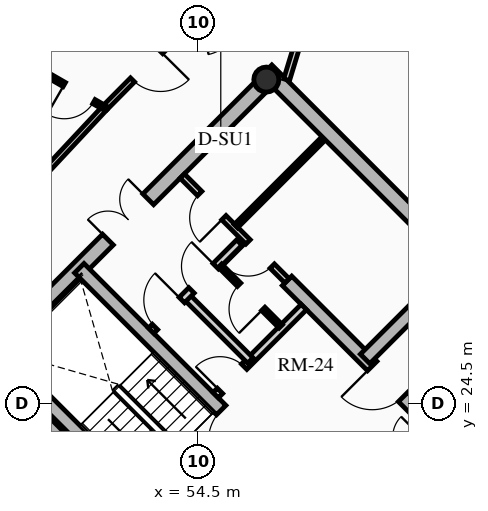
"""IFC4 building model, lengths in metres.
Left out: names, types, materials, properties, quantities, classifications, styles, units other than length and angle.
Written with IfcOpenShell. Run it as: python <this file> out.ifc"""

import sys

from ifc_helpers import new_model, si_unit, direction, frame, frame_2d, origin, origin_2d, place, context, subcontext, project, spatial, rectangle, hollow_circle, extrude, source, transform, mapped, element, fill, save


model = new_model("IFC4")
c1 = context("Model", 3, precision=1e-05, world=origin(), true_north=direction((0.0, 1.0)))
c2 = subcontext(c1, "Body", "Model", "MODEL_VIEW")
j1 = project(units=[si_unit("LENGTHUNIT", "METRE"), si_unit("PLANEANGLEUNIT", "RADIAN")], contexts=[c1])
p1 = place(None, origin())
s1 = spatial("IfcSite", under=j1, at=p1, CompositionType="ELEMENT")
p2 = place(p1, origin())
s2 = spatial("IfcBuilding", under=s1, at=p2, CompositionType="ELEMENT")
p3 = place(p2, frame((0.0, 0.0, 205.39)))
s3 = spatial("IfcBuildingStorey", under=s2, at=p3, CompositionType="ELEMENT", Elevation=205.39)
for number, where, z_axis, x_axis in (
    (1, (58.702, 15.732, 0.0), (0.0, 0.0, 1.0), (-0.707, 0.707, 0.0)),
    (2, (66.268, 23.298, 0.0), (0.0, 0.0, 1.0), (-0.707, 0.707, 0.0)),
):
    element("IfcWall", number, at=place(p3, frame(where, z_axis=z_axis, x_axis=x_axis)), inside=s3, PredefinedType="SHEAR", context=c2, shape_type="SweptSolid", body=[
        extrude(rectangle(XDim=14.1, YDim=0.4, at=frame_2d((7.05, 0.0))), origin(), (0.0, 0.0, 1.0), 2.91),
    ])
p4 = place(p3, frame((48.873, 25.561, 0.0), z_axis=(0.0, 0.0, 1.0), x_axis=(0.707106781187, 0.707106781187, 0.0)))
e3 = element("IfcWall", 3, at=p4, inside=s3, PredefinedType="SHEAR", context=c2, shape_type="SweptSolid", body=[
    extrude(rectangle(XDim=10.7, YDim=0.4, at=frame_2d((5.35, 0.0))), origin(), (0.0, 0.0, 1.0), 2.91),
])
m1 = source(origin(), c2, "Body", "SweptSolid", [
    extrude(rectangle(XDim=1.5, YDim=2.02, at=frame_2d((0.75, 1.01))), frame((0.0, 0.21, 0.0), z_axis=(0.0, -1.0, 0.0), x_axis=(1.0, 0.0, 0.0)), (0.0, 0.0, 1.0), 0.42),
])
p5 = place(p4, frame((4.6, 0.0, 0.0)))
e4 = element("IfcOpeningElement", 4, at=p5, cuts=e3, PredefinedType="OPENING", context=c2, shape_type="MappedRepresentation", body=[
    mapped(m1, transform((0.0, 0.0, 0.0), x_axis=(1.0, 0.0, 0.0), y_axis=(0.0, 1.0, 0.0), z_axis=(0.0, 0.0, 1.0), scale=1.0)),
])
p6 = place(p3, frame((61.06, 18.373, 0.0), z_axis=(0.0, 0.0, 1.0), x_axis=(-0.707106781187, 0.707106781187, 0.0)))
e5 = element("IfcWall", 5, at=p6, inside=s3, PredefinedType="SHEAR", context=c2, shape_type="SweptSolid", body=[
    extrude(rectangle(XDim=13.7, YDim=0.35, at=frame_2d((6.85, 0.0))), origin(), (0.0, 0.0, 1.0), 2.91),
])
m2 = source(origin(), c2, "Body", "SweptSolid", [
    extrude(rectangle(XDim=1.1, YDim=2.015, at=frame_2d((0.55, 1.007))), frame((0.0, 0.185, 0.0), z_axis=(0.0, -1.0, 0.0), x_axis=(1.0, 0.0, 0.0)), (0.0, 0.0, 1.0), 0.37),
])
p7 = place(p6, frame((4.85, 0.0, 0.0)))
e6 = element("IfcOpeningElement", 6, at=p7, cuts=e5, PredefinedType="OPENING", context=c2, shape_type="MappedRepresentation", body=[
    mapped(m2, transform((0.0, 0.0, 0.0), x_axis=(1.0, 0.0, 0.0), y_axis=(0.0, 1.0, 0.0), z_axis=(0.0, 0.0, 1.0), scale=1.0)),
])
p8 = place(p6, frame((0.625, 0.0, 0.0)))
e7 = element("IfcOpeningElement", 7, at=p8, cuts=e5, PredefinedType="OPENING", context=c2, shape_type="MappedRepresentation", body=[
    mapped(m2, transform((0.0, 0.0, 0.0), x_axis=(1.0, 0.0, 0.0), y_axis=(0.0, 1.0, 0.0), z_axis=(0.0, 0.0, 1.0), scale=1.0)),
])
p9 = place(p6, frame((2.625, 0.0, 0.0)))
e8 = element("IfcOpeningElement", 8, at=p9, cuts=e5, PredefinedType="OPENING", context=c2, shape_type="MappedRepresentation", body=[
    mapped(m2, transform((0.0, 0.0, 0.0), x_axis=(1.0, 0.0, 0.0), y_axis=(0.0, 1.0, 0.0), z_axis=(0.0, 0.0, 1.0), scale=1.0)),
])
m3 = source(origin(), c2, "Body", "SweptSolid", [
    extrude(rectangle(XDim=1.15, YDim=2.02, at=frame_2d((0.575, 1.01))), frame((0.0, 0.185, 0.0), z_axis=(0.0, -1.0, 0.0), x_axis=(1.0, 0.0, 0.0)), (0.0, 0.0, 1.0), 0.37),
])
p10 = place(p6, frame((7.27, 0.0, 0.0)))
e9 = element("IfcOpeningElement", 9, at=p10, cuts=e5, PredefinedType="OPENING", context=c2, shape_type="MappedRepresentation", body=[
    mapped(m3, transform((0.0, 0.0, 0.0), x_axis=(1.0, 0.0, 0.0), y_axis=(0.0, 1.0, 0.0), z_axis=(0.0, 0.0, 1.0), scale=1.0)),
])
p11 = place(p3, frame((63.627, 20.94, 0.0), z_axis=(0.0, 0.0, 1.0), x_axis=(-0.707119496762, 0.707094065383, 0.0)))
e10 = element("IfcWall", 10, at=p11, inside=s3, PredefinedType="SHEAR", context=c2, shape_type="SweptSolid", body=[
    extrude(rectangle(XDim=9.6, YDim=0.35, at=frame_2d((4.8, 0.0))), origin(), (0.0, 0.0, 1.0), 2.91),
])
p12 = place(p11, frame((5.28, 0.0, 0.0)))
e11 = element("IfcOpeningElement", 11, at=p12, cuts=e10, PredefinedType="OPENING", context=c2, shape_type="MappedRepresentation", body=[
    mapped(m3, transform((0.0, 0.0, 0.0), x_axis=(1.0, 0.0, 0.0), y_axis=(0.0, 1.0, 0.0), z_axis=(0.0, 0.0, 1.0), scale=1.0)),
])
p13 = place(p3, frame((53.922, 21.141, 0.0), z_axis=(0.0, 0.0, 1.0), x_axis=(-0.707106781187, 0.707106781187, 0.0)))
e12 = element("IfcWall", 12, at=p13, inside=s3, PredefinedType="SHEAR", context=c2, shape_type="SweptSolid", body=[
    extrude(rectangle(XDim=6.695, YDim=0.35, at=frame_2d((3.348, 0.0))), origin(), (0.0, 0.0, 1.0), 2.91),
])
p14 = place(p3, frame((58.893, 25.674, 0.0), z_axis=(0.0, 0.0, 1.0), x_axis=(0.707106781187, 0.707106781187, 0.0)))
e13 = element("IfcWall", 13, at=p14, inside=s3, PredefinedType="SHEAR", context=c2, shape_type="SweptSolid", body=[
    extrude(rectangle(XDim=3.285, YDim=0.35, at=frame_2d((1.643, 0.0))), origin(), (0.0, 0.0, 1.0), 2.91),
])
p15 = place(p3, frame((56.294, 33.024, 0.0), z_axis=(0.0, 0.0, 1.0), x_axis=(0.707106781187, 0.707106781187, 0.0)))
e14 = element("IfcColumn", 14, at=p15, inside=s3, PredefinedType="COLUMN", context=c2, shape_type="SweptSolid", body=[
    extrude(hollow_circle(Radius=0.33, WallThickness=0.025, at=origin_2d()), origin(), (0.0, 0.0, 1.0), 2.91),
])
p16 = place(p3, frame((58.214, 21.467, 0.0), z_axis=(0.0, 0.0, 1.0), x_axis=(0.707106781187, 0.707106781187, 0.0)))
e15 = element("IfcWall", 15, at=p16, inside=s3, PredefinedType="PARTITIONING", context=c2, shape_type="SweptSolid", body=[
    extrude(rectangle(XDim=3.28, YDim=0.2, at=frame_2d((1.64, 0.0))), origin(), (0.0, 0.0, 1.0), 2.685),
])
m4 = source(origin(), c2, "Body", "SweptSolid", [
    extrude(rectangle(XDim=1.5, YDim=2.02, at=frame_2d((0.75, 1.01))), frame((0.0, 0.11, 0.0), z_axis=(0.0, -1.0, 0.0), x_axis=(1.0, 0.0, 0.0)), (0.0, 0.0, 1.0), 0.22),
])
p17 = place(p16, frame((1.55, 0.0, 0.0)))
e16 = element("IfcOpeningElement", 16, at=p17, cuts=e15, PredefinedType="OPENING", context=c2, shape_type="MappedRepresentation", body=[
    mapped(m4, transform((0.0, 0.0, 0.0), x_axis=(1.0, 0.0, 0.0), y_axis=(0.0, 1.0, 0.0), z_axis=(0.0, 0.0, 1.0), scale=1.0)),
])
p18 = place(p3, frame((54.961, 24.719, 0.0), z_axis=(0.0, 0.0, 1.0), x_axis=(0.707106781187, 0.707106781187, 0.0)))
e17 = element("IfcWall", 17, at=p18, inside=s3, PredefinedType="PARTITIONING", context=c2, shape_type="SweptSolid", body=[
    extrude(rectangle(XDim=3.28, YDim=0.2, at=frame_2d((1.64, 0.0))), origin(), (0.0, 0.0, 1.0), 2.685),
])
m5 = source(origin(), c2, "Body", "SweptSolid", [
    extrude(rectangle(XDim=0.9, YDim=2.005, at=frame_2d((0.45, 1.002))), frame((0.0, 0.11, 0.0), z_axis=(0.0, -1.0, 0.0), x_axis=(1.0, 0.0, 0.0)), (0.0, 0.0, 1.0), 0.22),
])
p19 = place(p18, frame((0.16, 0.0, 0.0)))
e18 = element("IfcOpeningElement", 18, at=p19, cuts=e17, PredefinedType="OPENING", context=c2, shape_type="MappedRepresentation", body=[
    mapped(m5, transform((0.0, 0.0, 0.0), x_axis=(1.0, 0.0, 0.0), y_axis=(0.0, 1.0, 0.0), z_axis=(0.0, 0.0, 1.0), scale=1.0)),
])
p20 = place(p3, frame((55.874, 25.631, 0.0), z_axis=(0.0, 0.0, 1.0), x_axis=(-0.707157639372, 0.707055919343, 0.0)))
e19 = element("IfcWall", 19, at=p20, inside=s3, PredefinedType="PARTITIONING", context=c2, shape_type="SweptSolid", body=[
    extrude(rectangle(XDim=2.4, YDim=0.2, at=frame_2d((1.2, 0.0))), origin(), (0.0, 0.0, 1.0), 2.685),
])
p21 = place(p3, frame((53.264, 26.416, 0.0), z_axis=(0.0, 0.0, 1.0), x_axis=(0.707106781187, 0.707106781187, 0.0)))
e20 = element("IfcWall", 20, at=p21, inside=s3, PredefinedType="PARTITIONING", context=c2, shape_type="SweptSolid", body=[
    extrude(rectangle(XDim=3.28, YDim=0.2, at=frame_2d((1.64, 0.0))), origin(), (0.0, 0.0, 1.0), 2.685),
])
m6 = source(origin(), c2, "Body", "SweptSolid", [
    extrude(rectangle(XDim=1.0, YDim=2.015, at=frame_2d((0.5, 1.007))), frame((0.0, 0.11, 0.0), z_axis=(0.0, -1.0, 0.0), x_axis=(1.0, 0.0, 0.0)), (0.0, 0.0, 1.0), 0.22),
])
p22 = place(p21, frame((0.14, 0.0, 0.0)))
e21 = element("IfcOpeningElement", 21, at=p22, cuts=e20, PredefinedType="OPENING", context=c2, shape_type="MappedRepresentation", body=[
    mapped(m6, transform((0.0, 0.0, 0.0), x_axis=(1.0, 0.0, 0.0), y_axis=(0.0, 1.0, 0.0), z_axis=(0.0, 0.0, 1.0), scale=1.0)),
])
p23 = place(p21, frame((1.5, 0.0, 0.0)))
e22 = element("IfcOpeningElement", 22, at=p23, cuts=e20, PredefinedType="OPENING", context=c2, shape_type="MappedRepresentation", body=[
    mapped(m5, transform((0.0, 0.0, 0.0), x_axis=(1.0, 0.0, 0.0), y_axis=(0.0, 1.0, 0.0), z_axis=(0.0, 0.0, 1.0), scale=1.0)),
])
p24 = place(p3, frame((56.673, 26.529, 0.0), z_axis=(0.0, 0.0, 1.0), x_axis=(-0.707052764397, 0.70716079385, 0.0)))
e23 = element("IfcWall", 23, at=p24, inside=s3, PredefinedType="PARTITIONING", context=c2, shape_type="SweptSolid", body=[
    extrude(rectangle(XDim=2.26, YDim=0.125, at=frame_2d((1.13, 0.0))), origin(), (0.0, 0.0, 1.0), 2.685),
])
m7 = source(origin(), c2, "Body", "SweptSolid", [
    extrude(rectangle(XDim=0.9, YDim=2.005, at=frame_2d((0.45, 1.002))), frame((0.0, 0.073, 0.0), z_axis=(0.0, -1.0, 0.0), x_axis=(1.0, 0.0, 0.0)), (0.0, 0.0, 1.0), 0.145),
])
p25 = place(p24, frame((0.65, 0.0, 0.0)))
e24 = element("IfcOpeningElement", 24, at=p25, cuts=e23, PredefinedType="OPENING", context=c2, shape_type="MappedRepresentation", body=[
    mapped(m7, transform((0.0, 0.0, 0.0), x_axis=(1.0, 0.0, 0.0), y_axis=(0.0, 1.0, 0.0), z_axis=(0.0, 0.0, 1.0), scale=1.0)),
])
p26 = place(p3, frame((56.839, 27.728, 0.0), z_axis=(0.0, 0.0, 1.0), x_axis=(-0.707106781187, 0.707106781187, 0.0)))
e25 = element("IfcWall", 25, at=p26, inside=s3, PredefinedType="PARTITIONING", context=c2, shape_type="SweptSolid", body=[
    extrude(rectangle(XDim=3.9, YDim=0.16, at=frame_2d((1.95, 0.0))), origin(), (0.0, 0.0, 1.0), 2.685),
])
m8 = source(origin(), c2, "Body", "SweptSolid", [
    extrude(rectangle(XDim=0.9, YDim=2.005, at=frame_2d((0.45, 1.002))), frame((0.0, 0.09, 0.0), z_axis=(0.0, -1.0, 0.0), x_axis=(1.0, 0.0, 0.0)), (0.0, 0.0, 1.0), 0.18),
])
p27 = place(p26, frame((0.55, 0.0, 0.0)))
e26 = element("IfcOpeningElement", 26, at=p27, cuts=e25, PredefinedType="OPENING", context=c2, shape_type="MappedRepresentation", body=[
    mapped(m8, transform((0.0, 0.0, 0.0), x_axis=(1.0, 0.0, 0.0), y_axis=(0.0, 1.0, 0.0), z_axis=(0.0, 0.0, 1.0), scale=1.0)),
])
p28 = place(p26, frame((2.35, 0.0, 0.0)))
e27 = element("IfcOpeningElement", 27, at=p28, cuts=e25, PredefinedType="OPENING", context=c2, shape_type="MappedRepresentation", body=[
    mapped(m8, transform((0.0, 0.0, 0.0), x_axis=(1.0, 0.0, 0.0), y_axis=(0.0, 1.0, 0.0), z_axis=(0.0, 0.0, 1.0), scale=1.0)),
])
p29 = place(p3, frame((55.492, 29.167, 0.0), z_axis=(0.0, 0.0, 1.0), x_axis=(0.707144688645, 0.707068871696, 0.0)))
e28 = element("IfcWall", 28, at=p29, inside=s3, PredefinedType="PARTITIONING", context=c2, shape_type="SweptSolid", body=[
    extrude(rectangle(XDim=3.22, YDim=0.125, at=frame_2d((1.61, 0.0))), origin(), (0.0, 0.0, 1.0), 2.222),
])
p30 = place(p3, frame((54.427, 34.683, 0.0), z_axis=(0.0, 0.0, 1.0), x_axis=(-0.704178989986, -0.710022499687, 0.0)))
e29 = element("IfcWall", 29, at=p30, inside=s3, PredefinedType="PARTITIONING", context=c2, shape_type="SweptSolid", body=[
    extrude(rectangle(XDim=3.384, YDim=0.15, at=frame_2d((1.692, 0.0))), origin(), (0.0, 0.0, 1.0), 2.322),
])
m9 = source(origin(), c2, "Body", "SweptSolid", [
    extrude(rectangle(XDim=1.05, YDim=2.015, at=frame_2d((0.525, 1.007))), frame((0.0, 0.085, 0.0), z_axis=(0.0, -1.0, 0.0), x_axis=(1.0, 0.0, 0.0)), (0.0, 0.0, 1.0), 0.17),
])
p31 = place(p30, frame((1.298, 0.0, 0.0)))
e30 = element("IfcOpeningElement", 30, at=p31, cuts=e29, PredefinedType="OPENING", context=c2, shape_type="MappedRepresentation", body=[
    mapped(m9, transform((0.0, 0.0, 0.0), x_axis=(1.0, 0.0, 0.0), y_axis=(0.0, 1.0, 0.0), z_axis=(0.0, 0.0, 1.0), scale=1.0)),
])
p32 = place(p3, frame((52.043, 32.28, 0.0), z_axis=(0.0, 0.0, 1.0), x_axis=(-0.682606081633, -0.730786519661, 0.0)))
e31 = element("IfcWall", 31, at=p32, inside=s3, PredefinedType="PARTITIONING", context=c2, shape_type="SweptSolid", body=[
    extrude(rectangle(XDim=6.527, YDim=0.15, at=frame_2d((3.263, 0.0))), origin(), (0.0, 0.0, 1.0), 2.255),
])
p33 = place(p3, frame((56.828, 33.021, 0.0), z_axis=(0.0, 0.0, 1.0), x_axis=(0.292139093972, 0.956375841274, 0.0)))
e32 = element("IfcWall", 32, at=p33, inside=s3, PredefinedType="PARTITIONING", context=c2, shape_type="SweptSolid", body=[
    extrude(rectangle(XDim=2.186, YDim=0.16, at=frame_2d((1.093, 0.0))), origin(), (0.0, 0.0, 1.0), 2.255),
])
m10 = source(origin(), c2, "Body", "SweptSolid", [
    extrude(rectangle(XDim=1.05, YDim=2.015, at=frame_2d((0.525, 1.007))), frame((0.0, 0.09, 0.0), z_axis=(0.0, -1.0, 0.0), x_axis=(1.0, 0.0, 0.0)), (0.0, 0.0, 1.0), 0.18),
])
p34 = place(p33, frame((0.936, 0.0, 0.0)))
e33 = element("IfcOpeningElement", 33, at=p34, cuts=e32, PredefinedType="OPENING", context=c2, shape_type="MappedRepresentation", body=[
    mapped(m10, transform((0.0, 0.0, 0.0), x_axis=(1.0, 0.0, 0.0), y_axis=(0.0, 1.0, 0.0), z_axis=(0.0, 0.0, 1.0), scale=1.0)),
])
p35 = place(p3, frame((52.043, 32.28, 0.0), z_axis=(0.0, 0.0, 1.0), x_axis=(-0.866853616581, 0.498562741709, 0.0)))
e34 = element("IfcWall", 34, at=p35, inside=s3, PredefinedType="PARTITIONING", context=c2, shape_type="SweptSolid", body=[
    extrude(rectangle(XDim=6.308, YDim=0.125, at=frame_2d((3.154, 0.0))), origin(), (0.0, 0.0, 1.0), 2.322),
])
p36 = place(p35, frame((0.33, 0.0, 0.0)))
e35 = element("IfcOpeningElement", 35, at=p36, cuts=e34, PredefinedType="OPENING", context=c2, shape_type="MappedRepresentation", body=[
    mapped(m7, transform((0.0, 0.0, 0.0), x_axis=(1.0, 0.0, 0.0), y_axis=(0.0, 1.0, 0.0), z_axis=(0.0, 0.0, 1.0), scale=1.0)),
])
m11 = source(origin(), c2, "Body", "SweptSolid", [
    extrude(rectangle(XDim=1.15, YDim=2.02, at=frame_2d((0.575, 1.01))), frame((0.0, 0.025, 0.0), z_axis=(0.0, -1.0, 0.0), x_axis=(1.0, 0.0, 0.0)), (0.0, 0.0, 1.0), 0.05),
])
p37 = place(p10, origin())
e36 = element("IfcDoor", 36, at=p37, inside=s3, OperationType="SINGLE_SWING_LEFT", PredefinedType="DOOR", context=c2, shape_type="MappedRepresentation", body=[
    mapped(m11, transform((0.0, 0.0, 0.0), x_axis=(1.0, 0.0, 0.0), y_axis=(0.0, 1.0, 0.0), z_axis=(0.0, 0.0, 1.0), scale=1.0)),
])
fill(e9, e36)
p38 = place(p12, origin())
e37 = element("IfcDoor", 37, at=p38, inside=s3, OperationType="SINGLE_SWING_RIGHT", PredefinedType="DOOR", context=c2, shape_type="MappedRepresentation", body=[
    mapped(m11, transform((0.0, 0.0, 0.0), x_axis=(1.0, 0.0, 0.0), y_axis=(0.0, 1.0, 0.0), z_axis=(0.0, 0.0, 1.0), scale=1.0)),
])
fill(e11, e37)
m12 = source(origin(), c2, "Body", "SweptSolid", [
    extrude(rectangle(XDim=1.5, YDim=2.02, at=frame_2d((0.75, 1.01))), frame((0.0, 0.025, 0.0), z_axis=(0.0, -1.0, 0.0), x_axis=(1.0, 0.0, 0.0)), (0.0, 0.0, 1.0), 0.05),
])
p39 = place(p5, origin())
e38 = element("IfcDoor", 38, at=p39, inside=s3, OperationType="DOUBLE_DOOR_SINGLE_SWING", PredefinedType="DOOR", context=c2, shape_type="MappedRepresentation", body=[
    mapped(m12, transform((0.0, 0.0, 0.0), x_axis=(1.0, 0.0, 0.0), y_axis=(0.0, 1.0, 0.0), z_axis=(0.0, 0.0, 1.0), scale=1.0)),
])
fill(e4, e38)
m13 = source(origin(), c2, "Body", "SweptSolid", [
    extrude(rectangle(XDim=0.9, YDim=2.005, at=frame_2d((0.45, 1.002))), frame((0.0, 0.025, 0.0), z_axis=(0.0, -1.0, 0.0), x_axis=(1.0, 0.0, 0.0)), (0.0, 0.0, 1.0), 0.05),
])
p40 = place(p19, origin())
e39 = element("IfcDoor", 39, at=p40, inside=s3, OperationType="SINGLE_SWING_LEFT", PredefinedType="DOOR", context=c2, shape_type="MappedRepresentation", body=[
    mapped(m13, transform((0.0, 0.0, 0.0), x_axis=(1.0, 0.0, 0.0), y_axis=(0.0, 1.0, 0.0), z_axis=(0.0, 0.0, 1.0), scale=1.0)),
])
fill(e18, e39)
m14 = source(origin(), c2, "Body", "SweptSolid", [
    extrude(rectangle(XDim=1.0, YDim=2.015, at=frame_2d((0.5, 1.007))), frame((0.0, 0.025, 0.0), z_axis=(0.0, -1.0, 0.0), x_axis=(1.0, 0.0, 0.0)), (0.0, 0.0, 1.0), 0.05),
])
p41 = place(p22, origin())
e40 = element("IfcDoor", 40, at=p41, inside=s3, OperationType="SINGLE_SWING_RIGHT", PredefinedType="DOOR", context=c2, shape_type="MappedRepresentation", body=[
    mapped(m14, transform((0.0, 0.0, 0.0), x_axis=(1.0, 0.0, 0.0), y_axis=(0.0, 1.0, 0.0), z_axis=(0.0, 0.0, 1.0), scale=1.0)),
])
fill(e21, e40)
p42 = place(p23, origin())
e41 = element("IfcDoor", 41, at=p42, inside=s3, OperationType="SINGLE_SWING_RIGHT", PredefinedType="DOOR", context=c2, shape_type="MappedRepresentation", body=[
    mapped(m13, transform((0.0, 0.0, 0.0), x_axis=(1.0, 0.0, 0.0), y_axis=(0.0, 1.0, 0.0), z_axis=(0.0, 0.0, 1.0), scale=1.0)),
])
fill(e22, e41)
p43 = place(p25, origin())
e42 = element("IfcDoor", 42, at=p43, inside=s3, OperationType="SINGLE_SWING_LEFT", PredefinedType="DOOR", context=c2, shape_type="MappedRepresentation", body=[
    mapped(m13, transform((0.0, 0.0, 0.0), x_axis=(1.0, 0.0, 0.0), y_axis=(0.0, 1.0, 0.0), z_axis=(0.0, 0.0, 1.0), scale=1.0)),
])
fill(e24, e42)
p44 = place(p27, origin())
e43 = element("IfcDoor", 43, at=p44, inside=s3, OperationType="SINGLE_SWING_RIGHT", PredefinedType="DOOR", context=c2, shape_type="MappedRepresentation", body=[
    mapped(m13, transform((0.0, 0.0, 0.0), x_axis=(1.0, 0.0, 0.0), y_axis=(0.0, 1.0, 0.0), z_axis=(0.0, 0.0, 1.0), scale=1.0)),
])
fill(e26, e43)
p45 = place(p28, origin())
e44 = element("IfcDoor", 44, at=p45, inside=s3, OperationType="SINGLE_SWING_LEFT", PredefinedType="DOOR", context=c2, shape_type="MappedRepresentation", body=[
    mapped(m13, transform((0.0, 0.0, 0.0), x_axis=(1.0, 0.0, 0.0), y_axis=(0.0, 1.0, 0.0), z_axis=(0.0, 0.0, 1.0), scale=1.0)),
])
fill(e27, e44)
m15 = source(origin(), c2, "Body", "SweptSolid", [
    extrude(rectangle(XDim=1.05, YDim=2.015, at=frame_2d((0.525, 1.007))), frame((0.0, 0.025, 0.0), z_axis=(0.0, -1.0, 0.0), x_axis=(1.0, 0.0, 0.0)), (0.0, 0.0, 1.0), 0.05),
])
p46 = place(p31, origin())
e45 = element("IfcDoor", 45, at=p46, inside=s3, OperationType="SINGLE_SWING_LEFT", PredefinedType="DOOR", context=c2, shape_type="MappedRepresentation", body=[
    mapped(m15, transform((0.0, 0.0, 0.0), x_axis=(1.0, 0.0, 0.0), y_axis=(0.0, 1.0, 0.0), z_axis=(0.0, 0.0, 1.0), scale=1.0)),
])
fill(e30, e45)
p47 = place(p36, origin())
e46 = element("IfcDoor", 46, at=p47, inside=s3, OperationType="SINGLE_SWING_RIGHT", PredefinedType="DOOR", context=c2, shape_type="MappedRepresentation", body=[
    mapped(m13, transform((0.0, 0.0, 0.0), x_axis=(1.0, 0.0, 0.0), y_axis=(0.0, 1.0, 0.0), z_axis=(0.0, 0.0, 1.0), scale=1.0)),
])
fill(e35, e46)
save(model, sys.argv[1])
